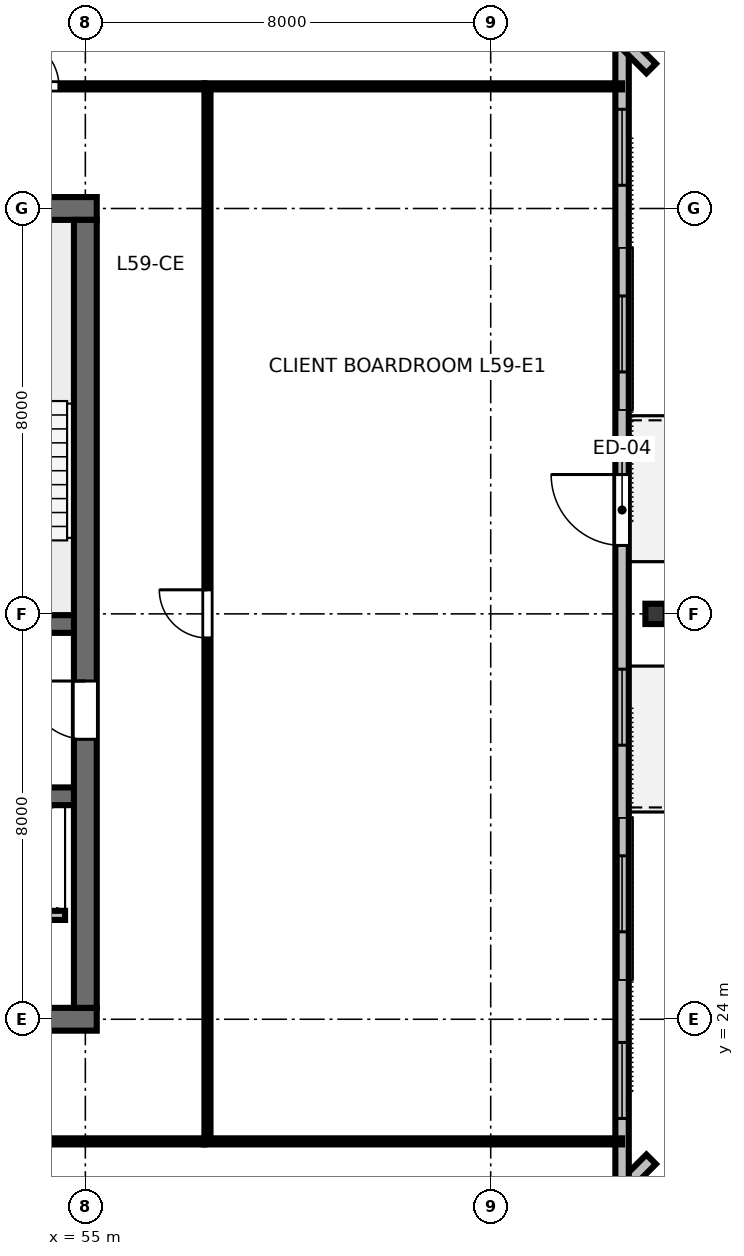
"""IFC4 building model, lengths in metres.
Left out: names, types, materials, properties, quantities, classifications, styles, units other than length and angle.
Written with IfcOpenShell. Run it as: python <this file> out.ifc"""

import sys

from ifc_helpers import new_model, si_unit, direction, frame, frame_2d, origin, origin_2d, place, context, subcontext, project, spatial, rectangle, i_section, extrude, element, fill, save


model = new_model("IFC4")
c1 = context("Model", 3, precision=1e-05, world=origin(), true_north=direction((0.0, 1.0)))
c2 = subcontext(c1, "Body", "Model", "MODEL_VIEW")
j1 = project(units=[si_unit("LENGTHUNIT", "METRE"), si_unit("PLANEANGLEUNIT", "RADIAN")], contexts=[c1])
p1 = place(None, origin())
s1 = spatial("IfcSite", under=j1, at=p1, CompositionType="ELEMENT")
p2 = place(p1, origin())
s2 = spatial("IfcBuilding", under=s1, at=p2, CompositionType="ELEMENT")
p3 = place(p2, frame((0.0, 0.0, 223.8)))
s3 = spatial("IfcBuildingStorey", under=s2, at=p3, CompositionType="ELEMENT", Elevation=223.8)
p4 = place(p3, frame((36.775, 24.0, 0.0), z_axis=(0.0, 0.0, 1.0), x_axis=(1.0, 0.0, 0.0)))
e1 = element("IfcWall", 1, at=p4, inside=s3, PredefinedType="SHEAR", context=c2, shape_type="SweptSolid", body=[
    extrude(rectangle(XDim=18.45, YDim=0.45, at=frame_2d((9.225, 0.0))), origin(), (0.0, 0.0, 1.0), 3.36),
])
p5 = place(p4, frame((13.425, 0.0, 0.0)))
e2 = element("IfcOpeningElement", 2, at=p5, cuts=e1, PredefinedType="OPENING", context=c2, shape_type="SweptSolid", body=[
    extrude(rectangle(XDim=1.6, YDim=2.15, at=frame_2d((0.8, 1.075))), frame((0.0, 0.235, 0.0), z_axis=(0.0, -1.0, 0.0), x_axis=(1.0, 0.0, 0.0)), (0.0, 0.0, 1.0), 0.47),
])
p6 = place(p3, frame((36.775, 40.0, 0.0), z_axis=(0.0, 0.0, 1.0), x_axis=(1.0, 0.0, 0.0)))
e3 = element("IfcWall", 3, at=p6, inside=s3, PredefinedType="SHEAR", context=c2, shape_type="SweptSolid", body=[
    extrude(rectangle(XDim=18.45, YDim=0.45, at=frame_2d((9.225, 0.0))), origin(), (0.0, 0.0, 1.0), 3.36),
])
p7 = place(p6, frame((10.525, 0.0, 0.0)))
e4 = element("IfcOpeningElement", 4, at=p7, cuts=e3, PredefinedType="OPENING", context=c2, shape_type="SweptSolid", body=[
    extrude(rectangle(XDim=1.0, YDim=2.15, at=frame_2d((0.5, 1.075))), frame((0.0, 0.235, 0.0), z_axis=(0.0, -1.0, 0.0), x_axis=(1.0, 0.0, 0.0)), (0.0, 0.0, 1.0), 0.47),
])
p8 = place(p3, frame((55.0, 24.225, 0.0), z_axis=(0.0, 0.0, 1.0), x_axis=(0.0, 1.0, 0.0)))
e5 = element("IfcWall", 5, at=p8, inside=s3, PredefinedType="SHEAR", context=c2, shape_type="SweptSolid", body=[
    extrude(rectangle(XDim=15.55, YDim=0.45, at=frame_2d((7.775, 0.0))), origin(), (0.0, 0.0, 1.0), 3.36),
])
p9 = place(p8, frame((5.3, 0.0, 0.0)))
e6 = element("IfcOpeningElement", 6, at=p9, cuts=e5, PredefinedType="OPENING", context=c2, shape_type="SweptSolid", body=[
    extrude(rectangle(XDim=1.15, YDim=2.15, at=frame_2d((0.575, 1.075))), frame((0.0, 0.235, 0.0), z_axis=(0.0, -1.0, 0.0), x_axis=(1.0, 0.0, 0.0)), (0.0, 0.0, 1.0), 0.47),
])
p10 = place(p3, frame((37.225, 31.8, 0.0), z_axis=(0.0, 0.0, 1.0), x_axis=(1.0, 0.0, 0.0)))
e7 = element("IfcWall", 7, at=p10, inside=s3, PredefinedType="SHEAR", context=c2, shape_type="SweptSolid", body=[
    extrude(rectangle(XDim=17.55, YDim=0.35, at=frame_2d((8.775, 0.0))), origin(), (0.0, 0.0, 1.0), 3.36),
])
p11 = place(p10, frame((0.825, 0.0, 0.0)))
e8 = element("IfcOpeningElement", 8, at=p11, cuts=e7, PredefinedType="OPENING", context=c2, shape_type="SweptSolid", body=[
    extrude(rectangle(XDim=1.1, YDim=2.15, at=frame_2d((0.55, 1.075))), frame((0.0, 0.185, 0.0), z_axis=(0.0, -1.0, 0.0), x_axis=(1.0, 0.0, 0.0)), (0.0, 0.0, 1.0), 0.37),
])
p12 = place(p10, frame((14.725, 0.0, 0.0)))
e9 = element("IfcOpeningElement", 9, at=p12, cuts=e7, PredefinedType="OPENING", context=c2, shape_type="SweptSolid", body=[
    extrude(rectangle(XDim=1.1, YDim=2.15, at=frame_2d((0.55, 1.075))), frame((0.0, 0.185, 0.0), z_axis=(0.0, -1.0, 0.0), x_axis=(1.0, 0.0, 0.0)), (0.0, 0.0, 1.0), 0.37),
])
p13 = place(p3, frame((37.225, 28.4, 0.0), z_axis=(0.0, 0.0, 1.0), x_axis=(1.0, 0.0, 0.0)))
e10 = element("IfcWall", 10, at=p13, inside=s3, PredefinedType="SHEAR", context=c2, shape_type="SweptSolid", body=[
    extrude(rectangle(XDim=17.55, YDim=0.35, at=frame_2d((8.775, 0.0))), origin(), (0.0, 0.0, 1.0), 3.36),
])
p14 = place(p3, frame((66.253, 32.0, 0.0), z_axis=(0.0, 0.0, 1.0), x_axis=(0.0, 1.0, 0.0)))
e11 = element("IfcColumn", 11, at=p14, inside=s3, PredefinedType="COLUMN", context=c2, shape_type="SweptSolid", body=[
    extrude(i_section(OverallWidth=0.401, OverallDepth=0.399, WebThickness=0.025, FlangeThickness=0.04, FilletRadius=0.025, at=origin_2d()), origin(), (0.0, 0.0, 1.0), 3.373),
])
p15 = place(p3, frame((58.809, 13.879, 0.0), z_axis=(0.0, 0.0, 1.0), x_axis=(0.707106781187, 0.707106781187, 0.0)))
e12 = element("IfcWall", 12, at=p15, inside=s3, PredefinedType="STANDARD", context=c2, shape_type="SweptSolid", body=[
    extrude(rectangle(XDim=10.405, YDim=0.265, at=frame_2d((5.203, 0.0))), origin(), (0.0, 0.0, 1.0), 3.375),
])
p16 = place(p3, frame((65.593, 19.851, 0.0), z_axis=(0.0, 0.0, 1.0), x_axis=(0.0, 1.0, 0.0)))
e13 = element("IfcWall", 13, at=p16, inside=s3, PredefinedType="STANDARD", context=c2, shape_type="SweptSolid", body=[
    extrude(rectangle(XDim=24.298, YDim=0.265, at=frame_2d((12.149, 0.0))), origin(), (0.0, 0.0, 1.0), 3.375),
])
p17 = place(p16, frame((13.499, 0.0, 0.0)))
e14 = element("IfcOpeningElement", 14, at=p17, cuts=e13, PredefinedType="OPENING", context=c2, shape_type="SweptSolid", body=[
    extrude(rectangle(XDim=1.4, YDim=2.15, at=frame_2d((0.7, 1.075))), frame((0.0, 0.142, 0.0), z_axis=(0.0, -1.0, 0.0), x_axis=(1.0, 0.0, 0.0)), (0.0, 0.0, 1.0), 0.285),
])
p18 = place(p16, frame((2.191, 0.0, 0.85)))
e15 = element("IfcOpeningElement", 15, at=p18, cuts=e13, PredefinedType="OPENING", context=c2, shape_type="SweptSolid", body=[
    extrude(rectangle(XDim=1.5, YDim=1.85, at=frame_2d((0.75, 0.925))), frame((0.0, 0.142, 0.0), z_axis=(0.0, -1.0, 0.0), x_axis=(1.0, 0.0, 0.0)), (0.0, 0.0, 1.0), 0.285),
])
p19 = place(p16, frame((5.875, 0.0, 0.85)))
e16 = element("IfcOpeningElement", 16, at=p19, cuts=e13, PredefinedType="OPENING", context=c2, shape_type="SweptSolid", body=[
    extrude(rectangle(XDim=1.5, YDim=1.85, at=frame_2d((0.75, 0.925))), frame((0.0, 0.142, 0.0), z_axis=(0.0, -1.0, 0.0), x_axis=(1.0, 0.0, 0.0)), (0.0, 0.0, 1.0), 0.285),
])
p20 = place(p16, frame((9.558, 0.0, 0.85)))
e17 = element("IfcOpeningElement", 17, at=p20, cuts=e13, PredefinedType="OPENING", context=c2, shape_type="SweptSolid", body=[
    extrude(rectangle(XDim=1.5, YDim=1.85, at=frame_2d((0.75, 0.925))), frame((0.0, 0.142, 0.0), z_axis=(0.0, -1.0, 0.0), x_axis=(1.0, 0.0, 0.0)), (0.0, 0.0, 1.0), 0.285),
])
p21 = place(p16, frame((16.924, 0.0, 0.85)))
e18 = element("IfcOpeningElement", 18, at=p21, cuts=e13, PredefinedType="OPENING", context=c2, shape_type="SweptSolid", body=[
    extrude(rectangle(XDim=1.5, YDim=1.85, at=frame_2d((0.75, 0.925))), frame((0.0, 0.142, 0.0), z_axis=(0.0, -1.0, 0.0), x_axis=(1.0, 0.0, 0.0)), (0.0, 0.0, 1.0), 0.285),
])
p22 = place(p16, frame((20.607, 0.0, 0.85)))
e19 = element("IfcOpeningElement", 19, at=p22, cuts=e13, PredefinedType="OPENING", context=c2, shape_type="SweptSolid", body=[
    extrude(rectangle(XDim=1.5, YDim=1.85, at=frame_2d((0.75, 0.925))), frame((0.0, 0.142, 0.0), z_axis=(0.0, -1.0, 0.0), x_axis=(1.0, 0.0, 0.0)), (0.0, 0.0, 1.0), 0.285),
])
p23 = place(p3, frame((66.167, 42.764, 0.0), z_axis=(0.0, 0.0, 1.0), x_axis=(-0.707106781187, 0.707106781187, 0.0)))
e20 = element("IfcWall", 20, at=p23, inside=s3, PredefinedType="STANDARD", context=c2, shape_type="SweptSolid", body=[
    extrude(rectangle(XDim=10.405, YDim=0.265, at=frame_2d((5.203, 0.0))), origin(), (0.0, 0.0, 1.0), 3.375),
])
p24 = place(p3, frame((47.6, 26.05, 0.0), z_axis=(0.0, 0.0, 1.0), x_axis=(1.0, 0.0, 0.0)))
e21 = element("IfcWall", 21, at=p24, inside=s3, PredefinedType="PARTITIONING", context=c2, shape_type="SweptSolid", body=[
    extrude(rectangle(XDim=7.0, YDim=0.18, at=frame_2d((3.5, 0.0))), origin(), (0.0, 0.0, 1.0), 3.375),
])
p25 = place(p24, frame((1.2, 0.0, 0.0)))
e22 = element("IfcOpeningElement", 22, at=p25, cuts=e21, PredefinedType="OPENING", context=c2, shape_type="SweptSolid", body=[
    extrude(rectangle(XDim=1.05, YDim=2.15, at=frame_2d((0.525, 1.075))), frame((0.0, 0.1, 0.0), z_axis=(0.0, -1.0, 0.0), x_axis=(1.0, 0.0, 0.0)), (0.0, 0.0, 1.0), 0.2),
])
p26 = place(p24, frame((3.4, 0.0, 0.0)))
e23 = element("IfcOpeningElement", 23, at=p26, cuts=e21, PredefinedType="OPENING", context=c2, shape_type="SweptSolid", body=[
    extrude(rectangle(XDim=1.05, YDim=2.15, at=frame_2d((0.525, 1.075))), frame((0.0, 0.1, 0.0), z_axis=(0.0, -1.0, 0.0), x_axis=(1.0, 0.0, 0.0)), (0.0, 0.0, 1.0), 0.2),
])
p27 = place(p3, frame((47.02, 21.59, 0.0), z_axis=(0.0, 0.0, 1.0), x_axis=(1.0, 0.0, 0.0)))
e24 = element("IfcWall", 24, at=p27, inside=s3, PredefinedType="PARTITIONING", context=c2, shape_type="SweptSolid", body=[
    extrude(rectangle(XDim=10.33, YDim=0.12, at=frame_2d((5.165, 0.0))), origin(), (0.0, 0.0, 1.0), 2.655),
])
p28 = place(p27, frame((1.104, 0.0, 0.0)))
e25 = element("IfcOpeningElement", 25, at=p28, cuts=e24, PredefinedType="OPENING", context=c2, shape_type="SweptSolid", body=[
    extrude(rectangle(XDim=0.95, YDim=2.15, at=frame_2d((0.475, 1.075))), frame((0.0, 0.07, 0.0), z_axis=(0.0, -1.0, 0.0), x_axis=(1.0, 0.0, 0.0)), (0.0, 0.0, 1.0), 0.14),
])
p29 = place(p27, frame((6.199, 0.0, 0.0)))
e26 = element("IfcOpeningElement", 26, at=p29, cuts=e24, PredefinedType="OPENING", context=c2, shape_type="SweptSolid", body=[
    extrude(rectangle(XDim=0.95, YDim=2.15, at=frame_2d((0.475, 1.075))), frame((0.0, 0.07, 0.0), z_axis=(0.0, -1.0, 0.0), x_axis=(1.0, 0.0, 0.0)), (0.0, 0.0, 1.0), 0.14),
])
p30 = place(p3, frame((47.02, 42.41, 0.0), z_axis=(0.0, 0.0, 1.0), x_axis=(1.0, 0.0, 0.0)))
e27 = element("IfcWall", 27, at=p30, inside=s3, PredefinedType="PARTITIONING", context=c2, shape_type="SweptSolid", body=[
    extrude(rectangle(XDim=10.33, YDim=0.12, at=frame_2d((5.165, 0.0))), origin(), (0.0, 0.0, 1.0), 2.655),
])
p31 = place(p30, frame((1.846, 0.0, 0.0)))
e28 = element("IfcOpeningElement", 28, at=p31, cuts=e27, PredefinedType="OPENING", context=c2, shape_type="SweptSolid", body=[
    extrude(rectangle(XDim=0.95, YDim=2.15, at=frame_2d((0.475, 1.075))), frame((0.0, 0.07, 0.0), z_axis=(0.0, -1.0, 0.0), x_axis=(1.0, 0.0, 0.0)), (0.0, 0.0, 1.0), 0.14),
])
p32 = place(p30, frame((6.509, 0.0, 0.0)))
e29 = element("IfcOpeningElement", 29, at=p32, cuts=e27, PredefinedType="OPENING", context=c2, shape_type="SweptSolid", body=[
    extrude(rectangle(XDim=0.95, YDim=2.15, at=frame_2d((0.475, 1.075))), frame((0.0, 0.07, 0.0), z_axis=(0.0, -1.0, 0.0), x_axis=(1.0, 0.0, 0.0)), (0.0, 0.0, 1.0), 0.14),
])
p33 = place(p3, frame((57.41, 21.65, 0.0), z_axis=(0.0, 0.0, 1.0), x_axis=(0.0, 1.0, 0.0)))
e30 = element("IfcWall", 30, at=p33, inside=s3, PredefinedType="PARTITIONING", context=c2, shape_type="SweptSolid", body=[
    extrude(rectangle(XDim=20.7, YDim=0.12, at=frame_2d((10.35, 0.0))), origin(), (0.0, 0.0, 1.0), 2.655),
])
p34 = place(p33, frame((9.875, 0.0, 0.0)))
e31 = element("IfcOpeningElement", 31, at=p34, cuts=e30, PredefinedType="OPENING", context=c2, shape_type="SweptSolid", body=[
    extrude(rectangle(XDim=0.95, YDim=2.15, at=frame_2d((0.475, 1.075))), frame((0.0, 0.07, 0.0), z_axis=(0.0, -1.0, 0.0), x_axis=(1.0, 0.0, 0.0)), (0.0, 0.0, 1.0), 0.14),
])
for number, where, z_axis, x_axis in (
    (32, (57.35, 21.59, 0.0), (0.0, 0.0, 1.0), (1.0, 0.0, 0.0)),
    (33, (57.35, 42.41, 0.0), (0.0, 0.0, 1.0), (1.0, 0.0, 0.0)),
):
    element("IfcWall", number, at=place(p3, frame(where, z_axis=z_axis, x_axis=x_axis)), inside=s3, PredefinedType="PARTITIONING", context=c2, shape_type="SweptSolid", body=[
        extrude(rectangle(XDim=8.243, YDim=0.12, at=frame_2d((4.121, 0.0))), origin(), (0.0, 0.0, 1.0), 2.655),
    ])
p35 = place(p17, origin())
e34 = element("IfcDoor", 34, at=p35, inside=s3, OperationType="SINGLE_SWING_RIGHT", PredefinedType="DOOR", context=c2, shape_type="SweptSolid", body=[
    extrude(rectangle(XDim=1.4, YDim=2.15, at=frame_2d((0.7, 1.075))), frame((0.0, 0.025, 0.0), z_axis=(0.0, -1.0, 0.0), x_axis=(1.0, 0.0, 0.0)), (0.0, 0.0, 1.0), 0.05),
])
fill(e14, e34)
p36 = place(p18, origin())
e35 = element("IfcWindow", 35, at=p36, inside=s3, PartitioningType="SINGLE_PANEL", PredefinedType="WINDOW", context=c2, shape_type="SweptSolid", body=[
    extrude(rectangle(XDim=1.5, YDim=1.85, at=frame_2d((0.75, 0.925))), frame((0.0, 0.03, 0.0), z_axis=(0.0, -1.0, 0.0), x_axis=(1.0, 0.0, 0.0)), (0.0, 0.0, 1.0), 0.06),
])
fill(e15, e35)
p37 = place(p19, origin())
e36 = element("IfcWindow", 36, at=p37, inside=s3, PartitioningType="SINGLE_PANEL", PredefinedType="WINDOW", context=c2, shape_type="SweptSolid", body=[
    extrude(rectangle(XDim=1.5, YDim=1.85, at=frame_2d((0.75, 0.925))), frame((0.0, 0.03, 0.0), z_axis=(0.0, -1.0, 0.0), x_axis=(1.0, 0.0, 0.0)), (0.0, 0.0, 1.0), 0.06),
])
fill(e16, e36)
p38 = place(p20, origin())
e37 = element("IfcWindow", 37, at=p38, inside=s3, PartitioningType="SINGLE_PANEL", PredefinedType="WINDOW", context=c2, shape_type="SweptSolid", body=[
    extrude(rectangle(XDim=1.5, YDim=1.85, at=frame_2d((0.75, 0.925))), frame((0.0, 0.03, 0.0), z_axis=(0.0, -1.0, 0.0), x_axis=(1.0, 0.0, 0.0)), (0.0, 0.0, 1.0), 0.06),
])
fill(e17, e37)
p39 = place(p21, origin())
e38 = element("IfcWindow", 38, at=p39, inside=s3, PartitioningType="SINGLE_PANEL", PredefinedType="WINDOW", context=c2, shape_type="SweptSolid", body=[
    extrude(rectangle(XDim=1.5, YDim=1.85, at=frame_2d((0.75, 0.925))), frame((0.0, 0.03, 0.0), z_axis=(0.0, -1.0, 0.0), x_axis=(1.0, 0.0, 0.0)), (0.0, 0.0, 1.0), 0.06),
])
fill(e18, e38)
p40 = place(p22, origin())
e39 = element("IfcWindow", 39, at=p40, inside=s3, PartitioningType="SINGLE_PANEL", PredefinedType="WINDOW", context=c2, shape_type="SweptSolid", body=[
    extrude(rectangle(XDim=1.5, YDim=1.85, at=frame_2d((0.75, 0.925))), frame((0.0, 0.03, 0.0), z_axis=(0.0, -1.0, 0.0), x_axis=(1.0, 0.0, 0.0)), (0.0, 0.0, 1.0), 0.06),
])
fill(e19, e39)
p41 = place(p9, origin())
e40 = element("IfcDoor", 40, at=p41, inside=s3, OperationType="SINGLE_SWING_RIGHT", PredefinedType="DOOR", context=c2, shape_type="SweptSolid", body=[
    extrude(rectangle(XDim=1.15, YDim=2.15, at=frame_2d((0.575, 1.075))), frame((0.0, 0.025, 0.0), z_axis=(0.0, -1.0, 0.0), x_axis=(1.0, 0.0, 0.0)), (0.0, 0.0, 1.0), 0.05),
])
fill(e6, e40)
p42 = place(p32, origin())
e41 = element("IfcDoor", 41, at=p42, inside=s3, OperationType="SINGLE_SWING_LEFT", PredefinedType="DOOR", context=c2, shape_type="SweptSolid", body=[
    extrude(rectangle(XDim=0.95, YDim=2.15, at=frame_2d((0.475, 1.075))), frame((0.0, 0.025, 0.0), z_axis=(0.0, -1.0, 0.0), x_axis=(1.0, 0.0, 0.0)), (0.0, 0.0, 1.0), 0.05),
])
fill(e29, e41)
p43 = place(p34, origin())
e42 = element("IfcDoor", 42, at=p43, inside=s3, OperationType="SINGLE_SWING_RIGHT", PredefinedType="DOOR", context=c2, shape_type="SweptSolid", body=[
    extrude(rectangle(XDim=0.95, YDim=2.15, at=frame_2d((0.475, 1.075))), frame((0.0, 0.025, 0.0), z_axis=(0.0, -1.0, 0.0), x_axis=(1.0, 0.0, 0.0)), (0.0, 0.0, 1.0), 0.05),
])
fill(e31, e42)
save(model, sys.argv[1])
